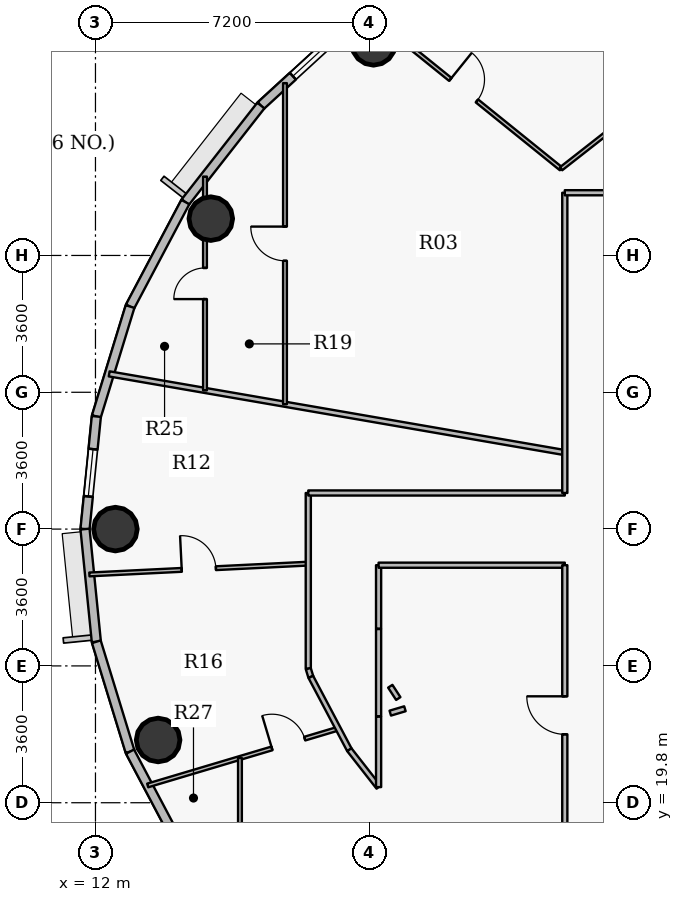
"""IFC4 building model, lengths in metres.
Left out: names, types, materials, properties, quantities, classifications, styles, units other than length and angle.
Written with IfcOpenShell. Run it as: python <this file> out.ifc"""

import sys

from ifc_helpers import new_model, si_unit, direction, frame, frame_2d, origin, origin_2d, place, context, subcontext, project, spatial, rectangle, hollow_circle, extrude, source, transform, mapped, element, fill, save


model = new_model("IFC4")
c1 = context("Model", 3, precision=1e-05, world=origin(), true_north=direction((0.0, 1.0)))
c2 = subcontext(c1, "Body", "Model", "MODEL_VIEW")
j1 = project(units=[si_unit("LENGTHUNIT", "METRE"), si_unit("PLANEANGLEUNIT", "RADIAN")], contexts=[c1])
p1 = place(None, origin())
s1 = spatial("IfcSite", under=j1, at=p1, CompositionType="ELEMENT")
p2 = place(p1, origin())
s2 = spatial("IfcBuilding", under=s1, at=p2, CompositionType="ELEMENT")
p3 = place(p2, frame((0.0, 0.0, 225.3)))
s3 = spatial("IfcBuildingStorey", under=s2, at=p3, CompositionType="ELEMENT", Elevation=225.3)
for number, where, z_axis, x_axis in (
    (1, (19.317, 39.781, 0.0), (0.0, 0.0, 1.0), (1.0, 0.0, 0.0)),
    (2, (15.035, 35.169, 0.0), (0.0, 0.0, 1.0), (1.0, 0.0, 0.0)),
    (3, (12.525, 27.0, 0.0), (0.0, 0.0, 1.0), (1.0, 0.0, 0.0)),
    (4, (13.649, 21.451, 0.0), (0.0, 0.0, 1.0), (1.0, 0.0, 0.0)),
):
    element("IfcColumn", number, at=place(p3, frame(where, z_axis=z_axis, x_axis=x_axis)), inside=s3, PredefinedType="COLUMN", context=c2, shape_type="SweptSolid", body=[
        extrude(hollow_circle(Radius=0.575, WallThickness=0.036, at=origin_2d()), origin(), (0.0, 0.0, 1.0), 3.75),
    ])
p4 = place(p3, frame((16.352, 38.145, 0.0), z_axis=(0.0, 0.0, 1.0), x_axis=(0.737123922599, 0.675757591694, 0.0)))
e5 = element("IfcWall", 5, at=p4, inside=s3, PredefinedType="SOLIDWALL", context=c2, shape_type="SweptSolid", body=[
    extrude(rectangle(XDim=3.354, YDim=0.24, at=frame_2d((1.677, 0.0))), origin(), (0.0, 0.0, 1.0), 3.5),
])
p5 = place(p4, frame((1.144, 0.0, 0.9)))
e6 = element("IfcOpeningElement", 6, at=p5, cuts=e5, PredefinedType="OPENING", context=c2, shape_type="SweptSolid", body=[
    extrude(rectangle(XDim=1.25, YDim=1.65, at=origin_2d()), frame((0.625, 0.13, 0.825), z_axis=(0.0, -1.0, 0.0), x_axis=(1.0, 0.0, 0.0)), (0.0, 0.0, 1.0), 0.26),
])
p6 = place(p3, frame((14.364, 35.605, 0.0), z_axis=(0.0, 0.0, 1.0), x_axis=(0.616312344705, 0.787501805562, 0.0)))
e7 = element("IfcWall", 7, at=p6, inside=s3, PredefinedType="SOLIDWALL", context=c2, shape_type="SweptSolid", body=[
    extrude(rectangle(XDim=3.225, YDim=0.24, at=frame_2d((1.612, 0.0))), origin(), (0.0, 0.0, 1.0), 3.5),
])
p7 = place(p3, frame((12.91, 32.856, 0.0), z_axis=(0.0, 0.0, 1.0), x_axis=(0.46766049993, 0.883908172157, 0.0)))
e8 = element("IfcWall", 8, at=p7, inside=s3, PredefinedType="SOLIDWALL", context=c2, shape_type="SweptSolid", body=[
    extrude(rectangle(XDim=3.11, YDim=0.24, at=frame_2d((1.555, 0.0))), origin(), (0.0, 0.0, 1.0), 3.5),
])
p8 = place(p3, frame((12.023, 29.964, 0.0), z_axis=(0.0, 0.0, 1.0), x_axis=(0.293132907334, 0.95607170162, 0.0)))
e9 = element("IfcWall", 9, at=p8, inside=s3, PredefinedType="SOLIDWALL", context=c2, shape_type="SweptSolid", body=[
    extrude(rectangle(XDim=3.025, YDim=0.24, at=frame_2d((1.512, 0.0))), origin(), (0.0, 0.0, 1.0), 3.5),
])
p9 = place(p3, frame((11.725, 27.0, 0.0), z_axis=(0.0, 0.0, 1.0), x_axis=(0.099990595253, 0.994988382274, 0.0)))
e10 = element("IfcWall", 10, at=p9, inside=s3, PredefinedType="SOLIDWALL", context=c2, shape_type="SweptSolid", body=[
    extrude(rectangle(XDim=2.979, YDim=0.24, at=frame_2d((1.489, 0.0))), origin(), (0.0, 0.0, 1.0), 3.5),
])
p10 = place(p9, frame((0.865, 0.0, 0.9)))
e11 = element("IfcOpeningElement", 11, at=p10, cuts=e10, PredefinedType="OPENING", context=c2, shape_type="SweptSolid", body=[
    extrude(rectangle(XDim=1.25, YDim=1.65, at=origin_2d()), frame((0.625, 0.13, 0.825), z_axis=(0.0, -1.0, 0.0), x_axis=(1.0, 0.0, 0.0)), (0.0, 0.0, 1.0), 0.26),
])
p11 = place(p3, frame((12.023, 24.036, 0.0), z_axis=(0.0, 0.0, 1.0), x_axis=(-0.099990595253, 0.994988382274, 0.0)))
e12 = element("IfcWall", 12, at=p11, inside=s3, PredefinedType="SOLIDWALL", context=c2, shape_type="SweptSolid", body=[
    extrude(rectangle(XDim=2.979, YDim=0.24, at=frame_2d((1.489, 0.0))), origin(), (0.0, 0.0, 1.0), 3.5),
])
p12 = place(p3, frame((12.91, 21.144, 0.0), z_axis=(0.0, 0.0, 1.0), x_axis=(-0.293132907334, 0.95607170162, 0.0)))
e13 = element("IfcWall", 13, at=p12, inside=s3, PredefinedType="SOLIDWALL", context=c2, shape_type="SweptSolid", body=[
    extrude(rectangle(XDim=3.025, YDim=0.24, at=frame_2d((1.512, 0.0))), origin(), (0.0, 0.0, 1.0), 3.5),
])
p13 = place(p3, frame((14.364, 18.395, 0.0), z_axis=(0.0, 0.0, 1.0), x_axis=(-0.46766049993, 0.883908172157, 0.0)))
e14 = element("IfcWall", 14, at=p13, inside=s3, PredefinedType="SOLIDWALL", context=c2, shape_type="SweptSolid", body=[
    extrude(rectangle(XDim=3.11, YDim=0.24, at=frame_2d((1.555, 0.0))), origin(), (0.0, 0.0, 1.0), 3.5),
])
p14 = place(p3, frame((11.84, 25.807, 0.0), z_axis=(0.0, 0.0, 1.0), x_axis=(0.99878109644, 0.049359106487, 0.0)))
e15 = element("IfcWall", 15, at=p14, inside=s3, PredefinedType="PARTITIONING", context=c2, shape_type="SweptSolid", body=[
    extrude(rectangle(XDim=5.767, YDim=0.1, at=frame_2d((2.884, 0.0))), origin(), (0.0, 0.0, 1.0), 2.985),
])
p15 = place(p14, frame((2.434, 0.0, 0.0)))
e16 = element("IfcOpeningElement", 16, at=p15, cuts=e15, PredefinedType="OPENING", context=c2, shape_type="SweptSolid", body=[
    extrude(rectangle(XDim=0.9, YDim=2.1, at=origin_2d()), frame((0.45, 0.06, 1.05), z_axis=(0.0, -1.0, 0.0), x_axis=(1.0, 0.0, 0.0)), (0.0, 0.0, 1.0), 0.12),
])
p16 = place(p3, frame((12.361, 31.084, 0.0), z_axis=(0.0, 0.0, 1.0), x_axis=(0.98539748391, -0.17026978212, 0.0)))
e17 = element("IfcWall", 17, at=p16, inside=s3, PredefinedType="PARTITIONING", context=c2, shape_type="SweptSolid", body=[
    extrude(rectangle(XDim=12.166, YDim=0.135, at=frame_2d((6.083, 0.0))), origin(), (0.0, 0.0, 1.0), 2.985),
])
p17 = place(p3, frame((13.375, 20.255, 0.0), z_axis=(0.0, 0.0, 1.0), x_axis=(0.95831691216, 0.285707360544, 0.0)))
e18 = element("IfcWall", 18, at=p17, inside=s3, PredefinedType="PARTITIONING", context=c2, shape_type="SweptSolid", body=[
    extrude(rectangle(XDim=5.23, YDim=0.1, at=frame_2d((2.615, 0.0))), origin(), (0.0, 0.0, 1.0), 2.985),
])
p18 = place(p17, frame((3.412, 0.0, 0.0)))
e19 = element("IfcOpeningElement", 19, at=p18, cuts=e18, PredefinedType="OPENING", context=c2, shape_type="SweptSolid", body=[
    extrude(rectangle(XDim=0.9, YDim=2.1, at=origin_2d()), frame((0.45, 0.06, 1.05), z_axis=(0.0, -1.0, 0.0), x_axis=(1.0, 0.0, 0.0)), (0.0, 0.0, 1.0), 0.12),
])
p19 = place(p3, frame((14.882, 30.649, 0.0), z_axis=(0.0, 0.0, 1.0), x_axis=(0.0, 1.0, 0.0)))
e20 = element("IfcWall", 20, at=p19, inside=s3, PredefinedType="PARTITIONING", context=c2, shape_type="SweptSolid", body=[
    extrude(rectangle(XDim=5.626, YDim=0.1, at=frame_2d((2.813, 0.0))), origin(), (0.0, 0.0, 1.0), 2.985),
])
p20 = place(p19, frame((2.403, 0.0, 0.0)))
e21 = element("IfcOpeningElement", 21, at=p20, cuts=e20, PredefinedType="OPENING", context=c2, shape_type="SweptSolid", body=[
    extrude(rectangle(XDim=0.82, YDim=2.1, at=origin_2d()), frame((0.41, 0.06, 1.05), z_axis=(0.0, -1.0, 0.0), x_axis=(1.0, 0.0, 0.0)), (0.0, 0.0, 1.0), 0.12),
])
p21 = place(p3, frame((15.802, 16.55, 0.0), z_axis=(0.0, 0.0, 1.0), x_axis=(0.0, 1.0, 0.0)))
e22 = element("IfcWall", 22, at=p21, inside=s3, PredefinedType="PARTITIONING", context=c2, shape_type="SweptSolid", body=[
    extrude(rectangle(XDim=4.429, YDim=0.1, at=frame_2d((2.214, 0.0))), origin(), (0.0, 0.0, 1.0), 2.985),
])
p22 = place(p21, frame((1.804, 0.0, 0.0)))
e23 = element("IfcOpeningElement", 23, at=p22, cuts=e22, PredefinedType="OPENING", context=c2, shape_type="SweptSolid", body=[
    extrude(rectangle(XDim=0.82, YDim=2.1, at=origin_2d()), frame((0.41, 0.06, 1.05), z_axis=(0.0, -1.0, 0.0), x_axis=(1.0, 0.0, 0.0)), (0.0, 0.0, 1.0), 0.12),
])
p23 = place(p3, frame((16.987, 30.285, 0.0), z_axis=(0.0, 0.0, 1.0), x_axis=(0.0, 1.0, 0.0)))
e24 = element("IfcWall", 24, at=p23, inside=s3, PredefinedType="PARTITIONING", context=c2, shape_type="SweptSolid", body=[
    extrude(rectangle(XDim=8.449, YDim=0.1, at=frame_2d((4.224, 0.0))), origin(), (0.0, 0.0, 1.0), 2.935),
])
p24 = place(p23, frame((3.774, 0.0, 0.0)))
e25 = element("IfcOpeningElement", 25, at=p24, cuts=e24, PredefinedType="OPENING", context=c2, shape_type="SweptSolid", body=[
    extrude(rectangle(XDim=0.9, YDim=2.1, at=origin_2d()), frame((0.45, 0.06, 1.05), z_axis=(0.0, -1.0, 0.0), x_axis=(1.0, 0.0, 0.0)), (0.0, 0.0, 1.0), 0.12),
])
p25 = place(p3, frame((17.6, 23.328, 0.0), z_axis=(0.0, 0.0, 1.0), x_axis=(0.0, 1.0, 0.0)))
e26 = element("IfcWall", 26, at=p25, inside=s3, PredefinedType="PARTITIONING", context=c2, shape_type="SweptSolid", body=[
    extrude(rectangle(XDim=4.622, YDim=0.135, at=frame_2d((2.311, 0.0))), origin(), (0.0, 0.0, 1.0), 2.935),
])
p26 = place(p3, frame((17.6, 23.328, 0.0), z_axis=(0.0, 0.0, 1.0), x_axis=(0.292875000845, -0.956150738053, 0.0)))
e27 = element("IfcWall", 27, at=p26, inside=s3, PredefinedType="PARTITIONING", context=c2, shape_type="SweptSolid", body=[
    extrude(rectangle(XDim=0.227, YDim=0.135, at=frame_2d((0.113, 0.0))), origin(), (0.0, 0.0, 1.0), 3.5),
])
p27 = place(p3, frame((17.6, 27.95, 0.0), z_axis=(0.0, 0.0, 1.0), x_axis=(1.0, 0.0, 0.0)))
e28 = element("IfcWall", 28, at=p27, inside=s3, PredefinedType="PARTITIONING", context=c2, shape_type="SweptSolid", body=[
    extrude(rectangle(XDim=6.75, YDim=0.135, at=frame_2d((3.375, 0.0))), origin(), (0.0, 0.0, 1.0), 3.5),
])
p28 = place(p3, frame((17.667, 23.111, 0.0), z_axis=(0.0, 0.0, 1.0), x_axis=(0.467582558239, -0.883949405357, 0.0)))
e29 = element("IfcWall", 29, at=p28, inside=s3, PredefinedType="PARTITIONING", context=c2, shape_type="SweptSolid", body=[
    extrude(rectangle(XDim=2.169, YDim=0.135, at=frame_2d((1.084, 0.0))), origin(), (0.0, 0.0, 1.0), 2.935),
])
p29 = place(p3, frame((18.681, 21.194, 0.0), z_axis=(0.0, 0.0, 1.0), x_axis=(0.616239706802, -0.787558647823, 0.0)))
e30 = element("IfcWall", 30, at=p29, inside=s3, PredefinedType="PARTITIONING", context=c2, shape_type="SweptSolid", body=[
    extrude(rectangle(XDim=1.248, YDim=0.135, at=frame_2d((0.624, 0.0))), origin(), (0.0, 0.0, 1.0), 3.5),
])
p30 = place(p3, frame((19.124, 40.618, 0.0), z_axis=(0.0, 0.0, 1.0), x_axis=(0.778207956818, -0.62800666871, 0.0)))
e31 = element("IfcWall", 31, at=p30, inside=s3, PredefinedType="PARTITIONING", context=c2, shape_type="SweptSolid", body=[
    extrude(rectangle(XDim=6.588, YDim=0.1, at=frame_2d((3.294, 0.0))), origin(), (0.0, 0.0, 1.0), 2.985),
])
p31 = place(p30, frame((2.844, 0.0, 0.0)))
e32 = element("IfcOpeningElement", 32, at=p31, cuts=e31, PredefinedType="OPENING", context=c2, shape_type="SweptSolid", body=[
    extrude(rectangle(XDim=0.9, YDim=2.1, at=origin_2d()), frame((0.45, 0.06, 1.05), z_axis=(0.0, -1.0, 0.0), x_axis=(1.0, 0.0, 0.0)), (0.0, 0.0, 1.0), 0.12),
])
p32 = place(p3, frame((19.45, 20.211, 0.0), z_axis=(0.0, 0.0, 1.0), x_axis=(0.0, 1.0, 0.0)))
e33 = element("IfcWall", 33, at=p32, inside=s3, PredefinedType="PARTITIONING", context=c2, shape_type="SweptSolid", body=[
    extrude(rectangle(XDim=1.855, YDim=0.135, at=frame_2d((0.927, 0.0))), origin(), (0.0, 0.0, 1.0), 3.5),
])
p33 = place(p3, frame((19.45, 24.38, 0.0), z_axis=(0.0, 0.0, 1.0), x_axis=(0.0, 1.0, 0.0)))
e34 = element("IfcWall", 34, at=p33, inside=s3, PredefinedType="PARTITIONING", context=c2, shape_type="SweptSolid", body=[
    extrude(rectangle(XDim=1.67, YDim=0.135, at=frame_2d((0.835, 0.0))), origin(), (0.0, 0.0, 1.0), 3.5),
])
p34 = place(p3, frame((19.45, 26.05, 0.0), z_axis=(0.0, 0.0, 1.0), x_axis=(1.0, 0.0, 0.0)))
e35 = element("IfcWall", 35, at=p34, inside=s3, PredefinedType="PARTITIONING", context=c2, shape_type="SweptSolid", body=[
    extrude(rectangle(XDim=4.9, YDim=0.135, at=frame_2d((2.45, 0.0))), origin(), (0.0, 0.0, 1.0), 3.5),
])
p35 = place(p3, frame((24.251, 36.481, 0.0), z_axis=(0.0, 0.0, 1.0), x_axis=(0.787374491509, 0.616474987426, 0.0)))
e36 = element("IfcWall", 36, at=p35, inside=s3, PredefinedType="PARTITIONING", context=c2, shape_type="SweptSolid", body=[
    extrude(rectangle(XDim=2.171, YDim=0.1, at=frame_2d((1.086, 0.0))), origin(), (0.0, 0.0, 1.0), 3.5),
])
p36 = place(p3, frame((24.35, 18.15, 0.0), z_axis=(0.0, 0.0, 1.0), x_axis=(0.0, 1.0, 0.0)))
e37 = element("IfcWall", 37, at=p36, inside=s3, PredefinedType="PARTITIONING", context=c2, shape_type="SweptSolid", body=[
    extrude(rectangle(XDim=7.9, YDim=0.135, at=frame_2d((3.95, 0.0))), origin(), (0.0, 0.0, 1.0), 2.935),
])
p37 = place(p36, frame((3.45, 0.0, 0.0)))
e38 = element("IfcOpeningElement", 38, at=p37, cuts=e37, PredefinedType="OPENING", context=c2, shape_type="SweptSolid", body=[
    extrude(rectangle(XDim=1.0, YDim=2.15, at=origin_2d()), frame((0.5, 0.078, 1.075), z_axis=(0.0, -1.0, 0.0), x_axis=(1.0, 0.0, 0.0)), (0.0, 0.0, 1.0), 0.155),
])
p38 = place(p3, frame((24.35, 27.95, 0.0), z_axis=(0.0, 0.0, 1.0), x_axis=(0.0, 1.0, 0.0)))
e39 = element("IfcWall", 39, at=p38, inside=s3, PredefinedType="PARTITIONING", context=c2, shape_type="SweptSolid", body=[
    extrude(rectangle(XDim=7.9, YDim=0.135, at=frame_2d((3.95, 0.0))), origin(), (0.0, 0.0, 1.0), 2.935),
])
p39 = place(p3, frame((24.35, 35.85, 0.0), z_axis=(0.0, 0.0, 1.0), x_axis=(1.0, 0.0, 0.0)))
e40 = element("IfcWall", 40, at=p39, inside=s3, PredefinedType="PARTITIONING", context=c2, shape_type="SweptSolid", body=[
    extrude(rectangle(XDim=26.218, YDim=0.135, at=frame_2d((13.109, 0.0))), origin(), (0.0, 0.0, 1.0), 2.935),
])
p40 = place(p39, frame((3.557, 0.0, 0.0)))
e41 = element("IfcOpeningElement", 41, at=p40, cuts=e40, PredefinedType="OPENING", context=c2, shape_type="SweptSolid", body=[
    extrude(rectangle(XDim=1.0, YDim=2.15, at=origin_2d()), frame((0.5, 0.078, 1.075), z_axis=(0.0, -1.0, 0.0), x_axis=(1.0, 0.0, 0.0)), (0.0, 0.0, 1.0), 0.155),
])
p41 = place(p39, frame((22.776, 0.0, 0.0)))
e42 = element("IfcOpeningElement", 42, at=p41, cuts=e40, PredefinedType="OPENING", context=c2, shape_type="SweptSolid", body=[
    extrude(rectangle(XDim=1.0, YDim=2.15, at=origin_2d()), frame((0.5, 0.078, 1.075), z_axis=(0.0, -1.0, 0.0), x_axis=(1.0, 0.0, 0.0)), (0.0, 0.0, 1.0), 0.155),
])
p42 = place(p39, frame((13.736, 0.0, 0.0)))
e43 = element("IfcOpeningElement", 43, at=p42, cuts=e40, PredefinedType="OPENING", context=c2, shape_type="SweptSolid", body=[
    extrude(rectangle(XDim=1.05, YDim=2.15, at=origin_2d()), frame((0.525, 0.078, 1.075), z_axis=(0.0, -1.0, 0.0), x_axis=(1.0, 0.0, 0.0)), (0.0, 0.0, 1.0), 0.155),
])
p43 = place(p39, frame((10.682, 0.0, 0.0)))
e44 = element("IfcOpeningElement", 44, at=p43, cuts=e40, PredefinedType="OPENING", context=c2, shape_type="SweptSolid", body=[
    extrude(rectangle(XDim=1.05, YDim=2.15, at=origin_2d()), frame((0.525, 0.078, 1.075), z_axis=(0.0, -1.0, 0.0), x_axis=(1.0, 0.0, 0.0)), (0.0, 0.0, 1.0), 0.155),
])
p44 = place(p39, frame((8.557, 0.0, 0.0)))
e45 = element("IfcOpeningElement", 45, at=p44, cuts=e40, PredefinedType="OPENING", context=c2, shape_type="SweptSolid", body=[
    extrude(rectangle(XDim=0.82, YDim=2.1, at=origin_2d()), frame((0.41, 0.078, 1.05), z_axis=(0.0, -1.0, 0.0), x_axis=(1.0, 0.0, 0.0)), (0.0, 0.0, 1.0), 0.155),
])
p45 = place(p3, frame((19.45, 24.37, 0.0), z_axis=(0.0, 0.0, 1.0), x_axis=(0.0, -1.0, 0.0)))
e46 = element("IfcWall", 46, at=p45, inside=s3, PredefinedType="PARTITIONING", context=c2, shape_type="SweptSolid", body=[
    extrude(rectangle(XDim=2.294, YDim=0.135, at=frame_2d((1.147, 0.0))), origin(), (0.0, 0.0, 1.0), 2.935),
])
p46 = place(p3, frame((19.758, 22.157, 0.0), z_axis=(0.0, 0.0, 1.0), x_axis=(0.95827609565, 0.285844231191, 0.0)))
e47 = element("IfcWall", 47, at=p46, inside=s3, PredefinedType="PARTITIONING", context=c2, shape_type="SweptSolid", body=[
    extrude(rectangle(XDim=0.402, YDim=0.135, at=frame_2d((0.201, 0.0))), origin(), (0.0, 0.0, 1.0), 3.5),
])
p47 = place(p3, frame((19.968, 22.541, 0.0), z_axis=(0.0, 0.0, 1.0), x_axis=(-0.545477029726, 0.838125772209, 0.0)))
e48 = element("IfcWall", 48, at=p47, inside=s3, PredefinedType="PARTITIONING", context=c2, shape_type="SweptSolid", body=[
    extrude(rectangle(XDim=0.386, YDim=0.135, at=frame_2d((0.193, 0.0))), origin(), (0.0, 0.0, 1.0), 2.935),
])
m1 = source(origin(), c2, "Body", "SweptSolid", [
    extrude(rectangle(XDim=1.25, YDim=1.65, at=origin_2d()), frame((0.625, 0.03, 0.825), z_axis=(0.0, -1.0, 0.0), x_axis=(1.0, 0.0, 0.0)), (0.0, 0.0, 1.0), 0.06),
])
p48 = place(p5, origin())
e49 = element("IfcWindow", 49, at=p48, inside=s3, PartitioningType="SINGLE_PANEL", PredefinedType="WINDOW", context=c2, shape_type="MappedRepresentation", body=[
    mapped(m1, transform((0.0, 0.0, 0.0), x_axis=(1.0, 0.0, 0.0), y_axis=(0.0, 1.0, 0.0), z_axis=(0.0, 0.0, 1.0), scale=1.0)),
])
fill(e6, e49)
p49 = place(p10, origin())
e50 = element("IfcWindow", 50, at=p49, inside=s3, PartitioningType="SINGLE_PANEL", PredefinedType="WINDOW", context=c2, shape_type="MappedRepresentation", body=[
    mapped(m1, transform((0.0, 0.0, 0.0), x_axis=(1.0, 0.0, 0.0), y_axis=(0.0, 1.0, 0.0), z_axis=(0.0, 0.0, 1.0), scale=1.0)),
])
fill(e11, e50)
m2 = source(origin(), c2, "Body", "SweptSolid", [
    extrude(rectangle(XDim=0.9, YDim=2.1, at=origin_2d()), frame((0.45, 0.025, 1.05), z_axis=(0.0, -1.0, 0.0), x_axis=(1.0, 0.0, 0.0)), (0.0, 0.0, 1.0), 0.05),
])
p50 = place(p31, origin())
e51 = element("IfcDoor", 51, at=p50, inside=s3, OperationType="SINGLE_SWING_LEFT", PredefinedType="DOOR", context=c2, shape_type="MappedRepresentation", body=[
    mapped(m2, transform((0.0, 0.0, 0.0), x_axis=(1.0, 0.0, 0.0), y_axis=(0.0, 1.0, 0.0), z_axis=(0.0, 0.0, 1.0), scale=1.0)),
])
fill(e32, e51)
p51 = place(p24, origin())
e52 = element("IfcDoor", 52, at=p51, inside=s3, OperationType="SINGLE_SWING_RIGHT", PredefinedType="DOOR", context=c2, shape_type="MappedRepresentation", body=[
    mapped(m2, transform((0.0, 0.0, 0.0), x_axis=(1.0, 0.0, 0.0), y_axis=(0.0, 1.0, 0.0), z_axis=(0.0, 0.0, 1.0), scale=1.0)),
])
fill(e25, e52)
m3 = source(origin(), c2, "Body", "SweptSolid", [
    extrude(rectangle(XDim=0.82, YDim=2.1, at=origin_2d()), frame((0.41, 0.025, 1.05), z_axis=(0.0, -1.0, 0.0), x_axis=(1.0, 0.0, 0.0)), (0.0, 0.0, 1.0), 0.05),
])
p52 = place(p20, origin())
e53 = element("IfcDoor", 53, at=p52, inside=s3, OperationType="SINGLE_SWING_LEFT", PredefinedType="DOOR", context=c2, shape_type="MappedRepresentation", body=[
    mapped(m3, transform((0.0, 0.0, 0.0), x_axis=(1.0, 0.0, 0.0), y_axis=(0.0, 1.0, 0.0), z_axis=(0.0, 0.0, 1.0), scale=1.0)),
])
fill(e21, e53)
m4 = source(origin(), c2, "Body", "SweptSolid", [
    extrude(rectangle(XDim=1.0, YDim=2.15, at=origin_2d()), frame((0.5, 0.025, 1.075), z_axis=(0.0, -1.0, 0.0), x_axis=(1.0, 0.0, 0.0)), (0.0, 0.0, 1.0), 0.05),
])
p53 = place(p37, origin())
e54 = element("IfcDoor", 54, at=p53, inside=s3, OperationType="SINGLE_SWING_RIGHT", PredefinedType="DOOR", context=c2, shape_type="MappedRepresentation", body=[
    mapped(m4, transform((0.0, 0.0, 0.0), x_axis=(1.0, 0.0, 0.0), y_axis=(0.0, 1.0, 0.0), z_axis=(0.0, 0.0, 1.0), scale=1.0)),
])
fill(e38, e54)
p54 = place(p18, origin())
e55 = element("IfcDoor", 55, at=p54, inside=s3, OperationType="SINGLE_SWING_LEFT", PredefinedType="DOOR", context=c2, shape_type="MappedRepresentation", body=[
    mapped(m2, transform((0.0, 0.0, 0.0), x_axis=(1.0, 0.0, 0.0), y_axis=(0.0, 1.0, 0.0), z_axis=(0.0, 0.0, 1.0), scale=1.0)),
])
fill(e19, e55)
p55 = place(p15, origin())
e56 = element("IfcDoor", 56, at=p55, inside=s3, OperationType="SINGLE_SWING_LEFT", PredefinedType="DOOR", context=c2, shape_type="MappedRepresentation", body=[
    mapped(m2, transform((0.0, 0.0, 0.0), x_axis=(1.0, 0.0, 0.0), y_axis=(0.0, 1.0, 0.0), z_axis=(0.0, 0.0, 1.0), scale=1.0)),
])
fill(e16, e56)
save(model, sys.argv[1])
